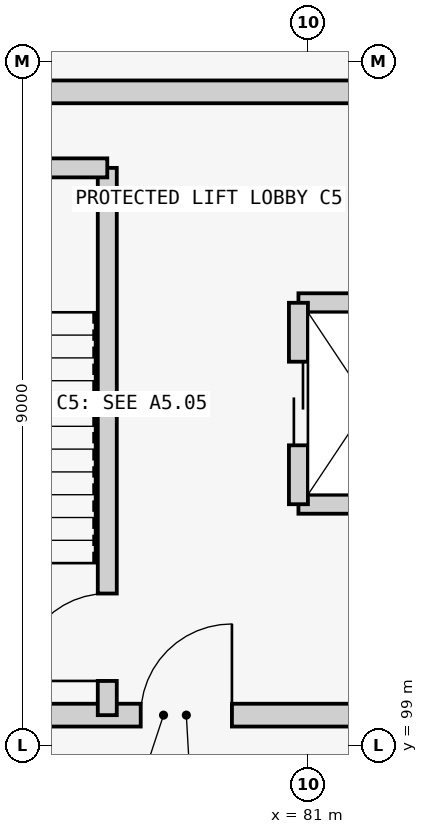
"""IFC4 building model, lengths in metres.
Left out: names, types, materials, properties, quantities, classifications, styles, units other than length and angle.
Written with IfcOpenShell. Run it as: python <this file> out.ifc"""

import sys

from ifc_helpers import new_model, si_unit, direction, frame, frame_2d, origin, place, context, subcontext, project, spatial, rectangle, extrude, element, fill, save


model = new_model("IFC4")
c1 = context("Model", 3, precision=1e-05, world=origin(), true_north=direction((0.0, 1.0)))
c2 = subcontext(c1, "Body", "Model", "MODEL_VIEW")
j1 = project(units=[si_unit("LENGTHUNIT", "METRE"), si_unit("PLANEANGLEUNIT", "RADIAN")], contexts=[c1])
p1 = place(None, origin())
s1 = spatial("IfcSite", under=j1, at=p1, CompositionType="ELEMENT")
p2 = place(p1, origin())
s2 = spatial("IfcBuilding", under=s1, at=p2, CompositionType="ELEMENT")
p3 = place(p2, frame((0.0, 0.0, -4.2)))
s3 = spatial("IfcBuildingStorey", under=s2, at=p3, CompositionType="ELEMENT", Elevation=-4.2)
p4 = place(p3, frame((74.0, 99.4, 0.0), z_axis=(0.0, 0.0, 1.0), x_axis=(1.0, 0.0, 0.0)))
e1 = element("IfcWall", 1, at=p4, inside=s3, PredefinedType="SHEAR", context=c2, shape_type="SweptSolid", body=[
    extrude(rectangle(XDim=10.2, YDim=0.3, at=frame_2d((5.1, 0.0))), origin(), (0.0, 0.0, 1.0), 3.94),
])
p5 = place(p4, frame((4.8, 0.0, 0.0)))
e2 = element("IfcOpeningElement", 2, at=p5, cuts=e1, PredefinedType="OPENING", context=c2, shape_type="SweptSolid", body=[
    extrude(rectangle(XDim=1.2, YDim=2.15, at=frame_2d((0.6, 1.075))), frame((0.0, 0.16, 0.0), z_axis=(0.0, -1.0, 0.0), x_axis=(1.0, 0.0, 0.0)), (0.0, 0.0, 1.0), 0.32),
])
p6 = place(p3, frame((84.2, 107.6, 0.0), z_axis=(0.0, 0.0, 1.0), x_axis=(-1.0, 0.0, 0.0)))
e3 = element("IfcWall", 3, at=p6, inside=s3, PredefinedType="SHEAR", context=c2, shape_type="SweptSolid", body=[
    extrude(rectangle(XDim=10.2, YDim=0.3, at=frame_2d((5.1, 0.0))), origin(), (0.0, 0.0, 1.0), 3.94),
])
p7 = place(p3, frame((78.36, 99.4, 0.0), z_axis=(0.0, 0.0, 1.0), x_axis=(0.0, 1.0, 0.0)))
e4 = element("IfcWall", 4, at=p7, inside=s3, PredefinedType="SHEAR", context=c2, shape_type="SweptSolid", body=[
    extrude(rectangle(XDim=7.2, YDim=0.25, at=frame_2d((3.6, 0.0))), origin(), (0.0, 0.0, 1.0), 3.94),
])
p8 = place(p7, frame((0.45, 0.0, 0.0)))
e5 = element("IfcOpeningElement", 5, at=p8, cuts=e4, PredefinedType="OPENING", context=c2, shape_type="SweptSolid", body=[
    extrude(rectangle(XDim=1.15, YDim=2.15, at=frame_2d((0.575, 1.075))), frame((0.0, 0.135, 0.0), z_axis=(0.0, -1.0, 0.0), x_axis=(1.0, 0.0, 0.0)), (0.0, 0.0, 1.0), 0.27),
])
p9 = place(p3, frame((74.0, 106.6, 0.0), z_axis=(0.0, 0.0, 1.0), x_axis=(1.0, 0.0, 0.0)))
e6 = element("IfcWall", 6, at=p9, inside=s3, PredefinedType="SHEAR", context=c2, shape_type="SweptSolid", body=[
    extrude(rectangle(XDim=4.36, YDim=0.25, at=frame_2d((2.18, 0.0))), origin(), (0.0, 0.0, 1.0), 3.94),
])
for number, where, z_axis, x_axis in (
    (7, (80.875, 102.175, 0.0), (0.0, 0.0, 1.0), (1.0, 0.0, 0.0)),
    (8, (80.875, 104.825, 0.0), (0.0, 0.0, 1.0), (1.0, 0.0, 0.0)),
):
    element("IfcWall", number, at=place(p3, frame(where, z_axis=z_axis, x_axis=x_axis)), inside=s3, PredefinedType="SHEAR", context=c2, shape_type="SweptSolid", body=[
        extrude(rectangle(XDim=1.85, YDim=0.25, at=frame_2d((0.925, 0.0))), origin(), (0.0, 0.0, 1.0), 3.94),
    ])
p10 = place(p3, frame((80.875, 102.175, 0.0), z_axis=(0.0, 0.0, 1.0), x_axis=(0.0, 1.0, 0.0)))
e9 = element("IfcWall", 9, at=p10, inside=s3, PredefinedType="SHEAR", context=c2, shape_type="SweptSolid", body=[
    extrude(rectangle(XDim=2.65, YDim=0.25, at=frame_2d((1.325, 0.0))), origin(), (0.0, 0.0, 1.0), 3.94),
])
p11 = place(p10, frame((0.775, 0.0, 0.0)))
e10 = element("IfcOpeningElement", 10, at=p11, cuts=e9, PredefinedType="OPENING", context=c2, shape_type="SweptSolid", body=[
    extrude(rectangle(XDim=1.1, YDim=2.15, at=frame_2d((0.55, 1.075))), frame((0.0, 0.135, 0.0), z_axis=(0.0, -1.0, 0.0), x_axis=(1.0, 0.0, 0.0)), (0.0, 0.0, 1.0), 0.27),
])
p12 = place(p8, origin())
e11 = element("IfcDoor", 11, at=p12, inside=s3, OperationType="SINGLE_SWING_LEFT", PredefinedType="DOOR", context=c2, shape_type="SweptSolid", body=[
    extrude(rectangle(XDim=1.15, YDim=2.15, at=frame_2d((0.575, 1.075))), frame((0.0, 0.025, 0.0), z_axis=(0.0, -1.0, 0.0), x_axis=(1.0, 0.0, 0.0)), (0.0, 0.0, 1.0), 0.05),
])
fill(e5, e11)
p13 = place(p5, origin())
e12 = element("IfcDoor", 12, at=p13, inside=s3, OperationType="SINGLE_SWING_RIGHT", PredefinedType="DOOR", context=c2, shape_type="SweptSolid", body=[
    extrude(rectangle(XDim=1.2, YDim=2.15, at=frame_2d((0.6, 1.075))), frame((0.0, 0.025, 0.0), z_axis=(0.0, -1.0, 0.0), x_axis=(1.0, 0.0, 0.0)), (0.0, 0.0, 1.0), 0.05),
])
fill(e2, e12)
p14 = place(p11, origin())
e13 = element("IfcDoor", 13, at=p14, inside=s3, OperationType="DOUBLE_DOOR_SLIDING", PredefinedType="USERDEFINED", context=c2, shape_type="SweptSolid", body=[
    extrude(rectangle(XDim=1.1, YDim=2.15, at=frame_2d((0.55, 1.075))), frame((0.0, 0.025, 0.0), z_axis=(0.0, -1.0, 0.0), x_axis=(1.0, 0.0, 0.0)), (0.0, 0.0, 1.0), 0.05),
])
fill(e10, e13)
save(model, sys.argv[1])
